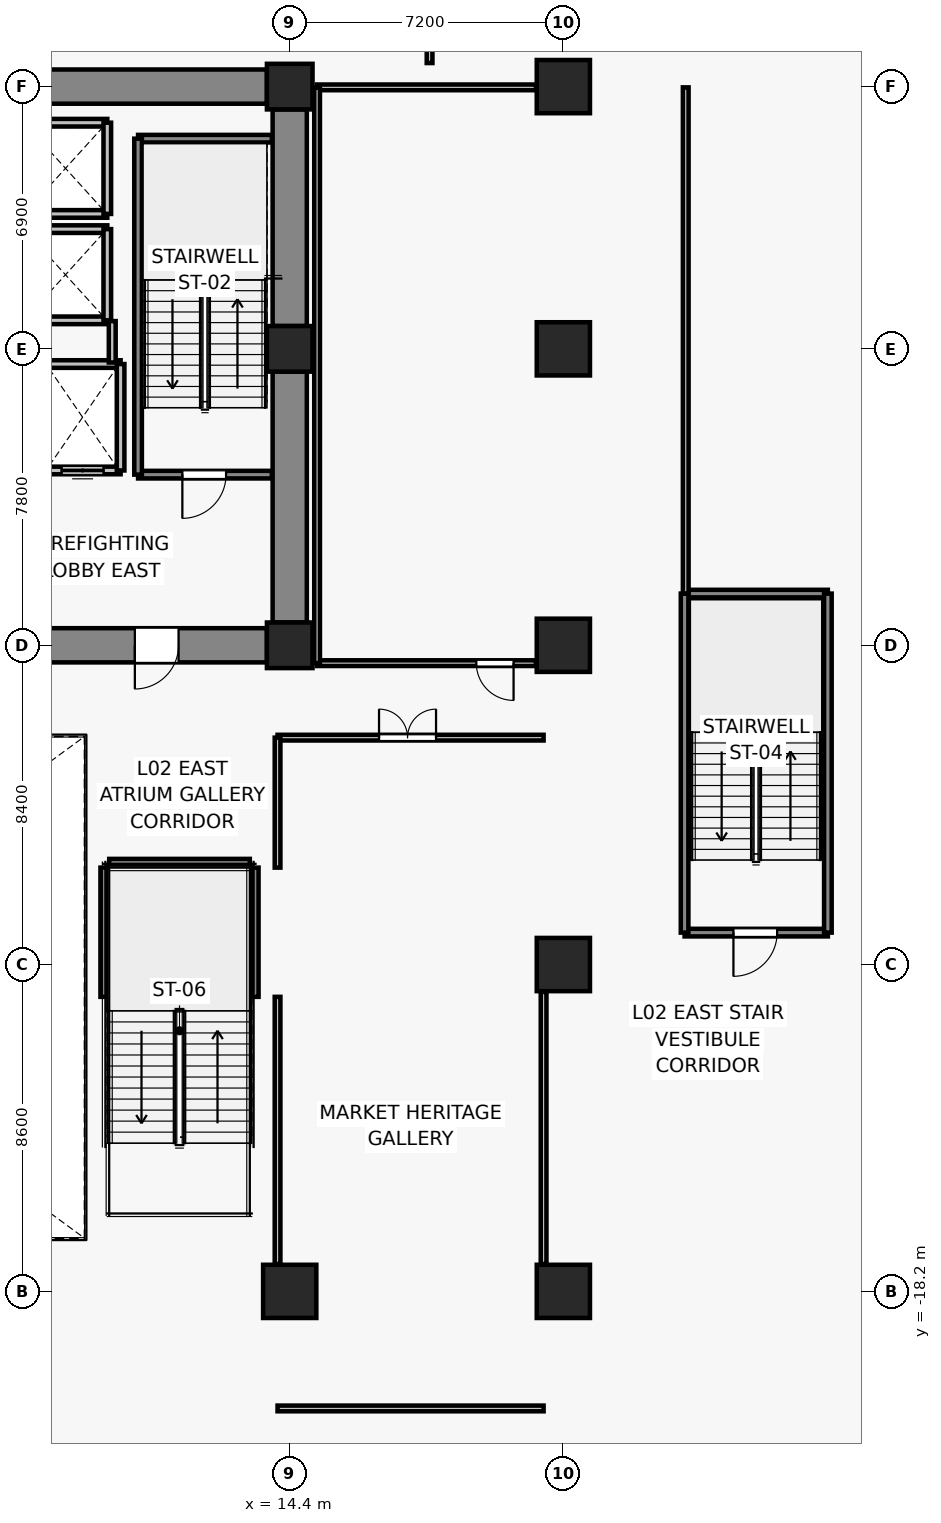
"""IFC4 building model, lengths in metres.
Left out: names, types, materials, properties, quantities, classifications, styles, units other than length and angle.
Written with IfcOpenShell. Run it as: python <this file> out.ifc"""

import sys

from ifc_helpers import new_model, si_unit, direction, frame, frame_2d, origin, origin_2d, place, context, subcontext, project, spatial, rectangle, extrude, source, transform, mapped, element, fill, save


model = new_model("IFC4")
c1 = context("Model", 3, precision=1e-05, world=origin(), true_north=direction((0.0, 1.0)))
c2 = subcontext(c1, "Body", "Model", "MODEL_VIEW")
j1 = project(units=[si_unit("LENGTHUNIT", "METRE"), si_unit("PLANEANGLEUNIT", "RADIAN")], contexts=[c1])
p1 = place(None, origin())
s1 = spatial("IfcSite", under=j1, at=p1, CompositionType="ELEMENT")
p2 = place(p1, origin())
s2 = spatial("IfcBuilding", under=s1, at=p2, CompositionType="ELEMENT")
p3 = place(p2, frame((0.0, 0.0, 9.4)))
s3 = spatial("IfcBuildingStorey", under=s2, at=p3, CompositionType="ELEMENT", Elevation=9.4)
for number, where, z_axis, x_axis in (
    (1, (14.4, -1.2, 0.0), (0.0, 0.0, 1.0), (1.0, 0.0, 0.0)),
    (2, (14.4, 6.6, 0.0), (0.0, 0.0, 1.0), (1.0, 0.0, 0.0)),
    (3, (14.4, 13.5, 0.0), (0.0, 0.0, 1.0), (1.0, 0.0, 0.0)),
):
    element("IfcColumn", number, at=place(p3, frame(where, z_axis=z_axis, x_axis=x_axis)), inside=s3, PredefinedType="COLUMN", context=c2, shape_type="SweptSolid", body=[
        extrude(rectangle(XDim=1.2, YDim=1.2, at=origin_2d()), origin(), (0.0, 0.0, 1.0), 4.4),
    ])
for number, where, z_axis, x_axis in (
    (4, (14.4, -18.2, 0.0), (0.0, 0.0, 1.0), (1.0, 0.0, 0.0)),
    (5, (21.6, -18.2, 0.0), (0.0, 0.0, 1.0), (1.0, 0.0, 0.0)),
    (6, (21.6, -9.6, 0.0), (0.0, 0.0, 1.0), (1.0, 0.0, 0.0)),
    (7, (21.6, -1.2, 0.0), (0.0, 0.0, 1.0), (1.0, 0.0, 0.0)),
    (8, (21.6, 6.6, 0.0), (0.0, 0.0, 1.0), (1.0, 0.0, 0.0)),
    (9, (21.6, 13.5, 0.0), (0.0, 0.0, 1.0), (1.0, 0.0, 0.0)),
):
    element("IfcColumn", number, at=place(p3, frame(where, z_axis=z_axis, x_axis=x_axis)), inside=s3, PredefinedType="COLUMN", context=c2, shape_type="SweptSolid", body=[
        extrude(rectangle(XDim=1.4, YDim=1.4, at=origin_2d()), origin(), (0.0, 0.0, 1.0), 4.4),
    ])
p4 = place(p3, frame((7.8, 13.5, 0.0), z_axis=(0.0, 0.0, 1.0), x_axis=(1.0, 0.0, 0.0)))
e10 = element("IfcWall", 10, at=p4, inside=s3, PredefinedType="SHEAR", context=c2, shape_type="SweptSolid", body=[
    extrude(rectangle(XDim=6.0, YDim=0.9, at=frame_2d((3.0, 0.0))), origin(), (0.0, 0.0, 1.0), 4.1),
])
p5 = place(p3, frame((14.4, -0.6, 0.0), z_axis=(0.0, 0.0, 1.0), x_axis=(0.0, 1.0, 0.0)))
e11 = element("IfcWall", 11, at=p5, inside=s3, PredefinedType="SHEAR", context=c2, shape_type="SweptSolid", body=[
    extrude(rectangle(XDim=6.6, YDim=0.9, at=frame_2d((3.3, 0.0))), origin(), (0.0, 0.0, 1.0), 4.1),
])
p6 = place(p3, frame((14.4, 7.2, 0.0), z_axis=(0.0, 0.0, 1.0), x_axis=(0.0, 1.0, 0.0)))
e12 = element("IfcWall", 12, at=p6, inside=s3, PredefinedType="SHEAR", context=c2, shape_type="SweptSolid", body=[
    extrude(rectangle(XDim=5.7, YDim=0.9, at=frame_2d((2.85, 0.0))), origin(), (0.0, 0.0, 1.0), 4.1),
])
p7 = place(p3, frame((13.8, -1.2, 0.0), z_axis=(0.0, 0.0, 1.0), x_axis=(-1.0, 0.0, 0.0)))
e13 = element("IfcWall", 13, at=p7, inside=s3, PredefinedType="SHEAR", context=c2, shape_type="SweptSolid", body=[
    extrude(rectangle(XDim=6.0, YDim=0.9, at=frame_2d((3.0, 0.0))), origin(), (0.0, 0.0, 1.0), 4.1),
])
p8 = place(p7, frame((2.325, 0.0, 0.0)))
e14 = element("IfcOpeningElement", 14, at=p8, cuts=e13, PredefinedType="OPENING", context=c2, shape_type="SweptSolid", body=[
    extrude(rectangle(XDim=1.15, YDim=2.15, at=frame_2d((0.575, 1.075))), frame((0.0, 0.46, 0.0), z_axis=(0.0, -1.0, 0.0), x_axis=(1.0, 0.0, 0.0)), (0.0, 0.0, 1.0), 0.92),
])
for number, where, z_axis, x_axis in (
    (15, (9.52, -10.45, 0.0), (0.0, 0.0, 1.0), (0.0, 1.0, 0.0)),
    (16, (13.48, -7.05, 0.0), (0.0, 0.0, 1.0), (0.0, -1.0, 0.0)),
):
    element("IfcWall", number, at=place(p3, frame(where, z_axis=z_axis, x_axis=x_axis)), inside=s3, PredefinedType="SOLIDWALL", context=c2, shape_type="SweptSolid", body=[
        extrude(rectangle(XDim=3.4, YDim=0.2, at=frame_2d((1.7, 0.0))), origin(), (0.0, 0.0, 1.0), 4.1),
    ])
p9 = place(p3, frame((9.65, -6.92, 0.0), z_axis=(0.0, 0.0, 1.0), x_axis=(1.0, 0.0, 0.0)))
e17 = element("IfcWall", 17, at=p9, inside=s3, PredefinedType="SOLIDWALL", context=c2, shape_type="SweptSolid", body=[
    extrude(rectangle(XDim=3.7, YDim=0.2, at=frame_2d((1.85, 0.0))), origin(), (0.0, 0.0, 1.0), 4.1),
])
p10 = place(p3, frame((9.95, 3.4, 0.0), z_axis=(0.0, 0.0, 1.0), x_axis=(-1.0, 0.0, 0.0)))
e18 = element("IfcWall", 18, at=p10, inside=s3, PredefinedType="SOLIDWALL", context=c2, shape_type="SweptSolid", body=[
    extrude(rectangle(XDim=2.0, YDim=0.2, at=frame_2d((1.0, 0.0))), origin(), (0.0, 0.0, 1.0), 4.1),
])
p11 = place(p10, frame((0.45, 0.0, 0.0)))
e19 = element("IfcOpeningElement", 19, at=p11, cuts=e18, PredefinedType="OPENING", context=c2, shape_type="SweptSolid", body=[
    extrude(rectangle(XDim=1.1, YDim=2.2, at=frame_2d((0.55, 1.1))), frame((0.0, 0.11, 0.0), z_axis=(0.0, -1.0, 0.0), x_axis=(1.0, 0.0, 0.0)), (0.0, 0.0, 1.0), 0.22),
])
p12 = place(p3, frame((7.95, 6.2, 0.0), z_axis=(0.0, 0.0, 1.0), x_axis=(1.0, 0.0, 0.0)))
e20 = element("IfcWall", 20, at=p12, inside=s3, PredefinedType="SOLIDWALL", context=c2, shape_type="SweptSolid", body=[
    extrude(rectangle(XDim=2.0, YDim=0.2, at=frame_2d((1.0, 0.0))), origin(), (0.0, 0.0, 1.0), 4.1),
])
p13 = place(p3, frame((9.95, 6.2, 0.0), z_axis=(0.0, 0.0, 1.0), x_axis=(0.0, -1.0, 0.0)))
e21 = element("IfcWall", 21, at=p13, inside=s3, PredefinedType="SOLIDWALL", context=c2, shape_type="SweptSolid", body=[
    extrude(rectangle(XDim=2.8, YDim=0.2, at=frame_2d((1.4, 0.0))), origin(), (0.0, 0.0, 1.0), 4.1),
])
for number, where, z_axis, x_axis in (
    (22, (9.6, 7.35, 0.0), (0.0, 0.0, 1.0), (-1.0, 0.0, 0.0)),
    (23, (7.4, 9.75, 0.0), (0.0, 0.0, 1.0), (1.0, 0.0, 0.0)),
):
    element("IfcWall", number, at=place(p3, frame(where, z_axis=z_axis, x_axis=x_axis)), inside=s3, PredefinedType="SOLIDWALL", context=c2, shape_type="SweptSolid", body=[
        extrude(rectangle(XDim=2.2, YDim=0.2, at=frame_2d((1.1, 0.0))), origin(), (0.0, 0.0, 1.0), 3.19),
    ])
p14 = place(p3, frame((9.6, 9.75, 0.0), z_axis=(0.0, 0.0, 1.0), x_axis=(0.0, -1.0, 0.0)))
e24 = element("IfcWall", 24, at=p14, inside=s3, PredefinedType="SOLIDWALL", context=c2, shape_type="SweptSolid", body=[
    extrude(rectangle(XDim=2.4, YDim=0.2, at=frame_2d((1.2, 0.0))), origin(), (0.0, 0.0, 1.0), 4.1),
])
for number, where, z_axis, x_axis in (
    (25, (9.6, 10.15, 0.0), (0.0, 0.0, 1.0), (-1.0, 0.0, 0.0)),
    (26, (7.4, 12.55, 0.0), (0.0, 0.0, 1.0), (1.0, 0.0, 0.0)),
):
    element("IfcWall", number, at=place(p3, frame(where, z_axis=z_axis, x_axis=x_axis)), inside=s3, PredefinedType="SOLIDWALL", context=c2, shape_type="SweptSolid", body=[
        extrude(rectangle(XDim=2.2, YDim=0.2, at=frame_2d((1.1, 0.0))), origin(), (0.0, 0.0, 1.0), 3.19),
    ])
p15 = place(p3, frame((9.6, 12.55, 0.0), z_axis=(0.0, 0.0, 1.0), x_axis=(0.0, -1.0, 0.0)))
e27 = element("IfcWall", 27, at=p15, inside=s3, PredefinedType="SOLIDWALL", context=c2, shape_type="SweptSolid", body=[
    extrude(rectangle(XDim=2.4, YDim=0.2, at=frame_2d((1.2, 0.0))), origin(), (0.0, 0.0, 1.0), 4.1),
])
p16 = place(p3, frame((13.93, 3.29, 0.0), z_axis=(0.0, 0.0, 1.0), x_axis=(-1.0, 0.0, 0.0)))
e28 = element("IfcWall", 28, at=p16, inside=s3, PredefinedType="SOLIDWALL", context=c2, shape_type="SweptSolid", body=[
    extrude(rectangle(XDim=3.52, YDim=0.2, at=frame_2d((1.76, 0.0))), origin(), (0.0, 0.0, 1.0), 4.1),
])
p17 = place(p16, frame((1.205, 0.0, 0.0)))
e29 = element("IfcOpeningElement", 29, at=p17, cuts=e28, PredefinedType="OPENING", context=c2, shape_type="SweptSolid", body=[
    extrude(rectangle(XDim=1.15, YDim=2.15, at=frame_2d((0.575, 1.075))), frame((0.0, 0.11, 0.0), z_axis=(0.0, -1.0, 0.0), x_axis=(1.0, 0.0, 0.0)), (0.0, 0.0, 1.0), 0.22),
])
p18 = place(p3, frame((10.41, 12.13, 0.0), z_axis=(0.0, 0.0, 1.0), x_axis=(1.0, 0.0, 0.0)))
e30 = element("IfcWall", 30, at=p18, inside=s3, PredefinedType="SOLIDWALL", context=c2, shape_type="SweptSolid", body=[
    extrude(rectangle(XDim=3.52, YDim=0.2, at=frame_2d((1.76, 0.0))), origin(), (0.0, 0.0, 1.0), 4.1),
])
p19 = place(p3, frame((10.41, 3.29, 0.0), z_axis=(0.0, 0.0, 1.0), x_axis=(0.0, 1.0, 0.0)))
e31 = element("IfcWall", 31, at=p19, inside=s3, PredefinedType="SOLIDWALL", context=c2, shape_type="SweptSolid", body=[
    extrude(rectangle(XDim=8.84, YDim=0.2, at=frame_2d((4.42, 0.0))), origin(), (0.0, 0.0, 1.0), 4.1),
])
p20 = place(p3, frame((9.73, 7.33, 0.0), z_axis=(0.0, 0.0, 1.0), x_axis=(0.0, -1.0, 0.0)))
e32 = element("IfcWall", 32, at=p20, inside=s3, PredefinedType="PARTITIONING", context=c2, shape_type="SweptSolid", body=[
    extrude(rectangle(XDim=1.09, YDim=0.18, at=frame_2d((0.545, 0.0))), origin(), (0.0, 0.0, 1.0), 4.1),
])
p21 = place(p3, frame((28.56, -8.76, 0.0), z_axis=(0.0, 0.0, 1.0), x_axis=(-1.0, 0.0, 0.0)))
e33 = element("IfcWall", 33, at=p21, inside=s3, PredefinedType="SOLIDWALL", context=c2, shape_type="SweptSolid", body=[
    extrude(rectangle(XDim=3.77, YDim=0.2, at=frame_2d((1.885, 0.0))), origin(), (0.0, 0.0, 1.0), 4.1),
])
p22 = place(p21, frame((1.335, 0.0, 0.0)))
e34 = element("IfcOpeningElement", 34, at=p22, cuts=e33, PredefinedType="OPENING", context=c2, shape_type="SweptSolid", body=[
    extrude(rectangle(XDim=1.15, YDim=2.15, at=frame_2d((0.575, 1.075))), frame((0.0, 0.11, 0.0), z_axis=(0.0, -1.0, 0.0), x_axis=(1.0, 0.0, 0.0)), (0.0, 0.0, 1.0), 0.22),
])
p23 = place(p3, frame((24.79, 0.16, 0.0), z_axis=(0.0, 0.0, 1.0), x_axis=(1.0, 0.0, 0.0)))
e35 = element("IfcWall", 35, at=p23, inside=s3, PredefinedType="SOLIDWALL", context=c2, shape_type="SweptSolid", body=[
    extrude(rectangle(XDim=3.77, YDim=0.2, at=frame_2d((1.885, 0.0))), origin(), (0.0, 0.0, 1.0), 4.1),
])
for number, where, z_axis, x_axis in (
    (36, (24.79, -8.76, 0.0), (0.0, 0.0, 1.0), (0.0, 1.0, 0.0)),
    (37, (28.56, 0.16, 0.0), (0.0, 0.0, 1.0), (0.0, -1.0, 0.0)),
):
    element("IfcWall", number, at=place(p3, frame(where, z_axis=z_axis, x_axis=x_axis)), inside=s3, PredefinedType="SOLIDWALL", context=c2, shape_type="SweptSolid", body=[
        extrude(rectangle(XDim=8.92, YDim=0.2, at=frame_2d((4.46, 0.0))), origin(), (0.0, 0.0, 1.0), 4.1),
    ])
p24 = place(p3, frame((21.08, -21.28, 0.0), z_axis=(0.0, 0.0, 1.0), x_axis=(-1.0, 0.0, 0.0)))
e38 = element("IfcWall", 38, at=p24, inside=s3, PredefinedType="PARTITIONING", context=c2, shape_type="SweptSolid", body=[
    extrude(rectangle(XDim=7.0, YDim=0.15, at=frame_2d((3.5, 0.0))), origin(), (0.0, 0.0, 1.0), 3.19),
])
p25 = place(p3, frame((14.08, -3.63, 0.0), z_axis=(0.0, 0.0, 1.0), x_axis=(1.0, 0.0, 0.0)))
e39 = element("IfcWall", 39, at=p25, inside=s3, PredefinedType="PARTITIONING", context=c2, shape_type="SweptSolid", body=[
    extrude(rectangle(XDim=7.0, YDim=0.15, at=frame_2d((3.5, 0.0))), origin(), (0.0, 0.0, 1.0), 3.239),
])
p26 = place(p25, frame((2.67, 0.0, 0.0)))
e40 = element("IfcOpeningElement", 40, at=p26, cuts=e39, PredefinedType="OPENING", context=c2, shape_type="SweptSolid", body=[
    extrude(rectangle(XDim=1.5, YDim=2.2, at=frame_2d((0.75, 1.1))), frame((0.0, 0.085, 0.0), z_axis=(0.0, -1.0, 0.0), x_axis=(1.0, 0.0, 0.0)), (0.0, 0.0, 1.0), 0.17),
])
p27 = place(p3, frame((14.08, -17.48, 0.0), z_axis=(0.0, 0.0, 1.0), x_axis=(0.0, 1.0, 0.0)))
e41 = element("IfcWall", 41, at=p27, inside=s3, PredefinedType="PARTITIONING", context=c2, shape_type="SweptSolid", body=[
    extrude(rectangle(XDim=7.03, YDim=0.15, at=frame_2d((3.515, 0.0))), origin(), (0.0, 0.0, 1.0), 3.29),
])
p28 = place(p3, frame((14.08, -7.05, 0.0), z_axis=(0.0, 0.0, 1.0), x_axis=(0.0, 1.0, 0.0)))
e42 = element("IfcWall", 42, at=p28, inside=s3, PredefinedType="PARTITIONING", context=c2, shape_type="SweptSolid", body=[
    extrude(rectangle(XDim=3.42, YDim=0.15, at=frame_2d((1.71, 0.0))), origin(), (0.0, 0.0, 1.0), 3.29),
])
p29 = place(p3, frame((21.08, -10.32, 0.0), z_axis=(0.0, 0.0, 1.0), x_axis=(0.0, -1.0, 0.0)))
e43 = element("IfcWall", 43, at=p29, inside=s3, PredefinedType="PARTITIONING", context=c2, shape_type="SweptSolid", body=[
    extrude(rectangle(XDim=7.16, YDim=0.15, at=frame_2d((3.58, 0.0))), origin(), (0.0, 0.0, 1.0), 3.29),
])
p30 = place(p3, frame((20.88, -1.67, 0.0), z_axis=(0.0, 0.0, 1.0), x_axis=(-1.0, 0.0, 0.0)))
e44 = element("IfcWall", 44, at=p30, inside=s3, PredefinedType="PARTITIONING", context=c2, shape_type="SweptSolid", body=[
    extrude(rectangle(XDim=5.76, YDim=0.15, at=frame_2d((2.88, 0.0))), origin(), (0.0, 0.0, 1.0), 4.1),
])
p31 = place(p30, frame((0.59, 0.0, 0.0)))
e45 = element("IfcOpeningElement", 45, at=p31, cuts=e44, PredefinedType="OPENING", context=c2, shape_type="SweptSolid", body=[
    extrude(rectangle(XDim=0.98, YDim=2.15, at=frame_2d((0.49, 1.075))), frame((0.0, 0.085, 0.0), z_axis=(0.0, -1.0, 0.0), x_axis=(1.0, 0.0, 0.0)), (0.0, 0.0, 1.0), 0.17),
])
p32 = place(p3, frame((15.12, 13.48, 0.0), z_axis=(0.0, 0.0, 1.0), x_axis=(1.0, 0.0, 0.0)))
e46 = element("IfcWall", 46, at=p32, inside=s3, PredefinedType="PARTITIONING", context=c2, shape_type="SweptSolid", body=[
    extrude(rectangle(XDim=5.76, YDim=0.15, at=frame_2d((2.88, 0.0))), origin(), (0.0, 0.0, 1.0), 3.19),
])
p33 = place(p3, frame((15.12, -1.67, 0.0), z_axis=(0.0, 0.0, 1.0), x_axis=(0.0, 1.0, 0.0)))
e47 = element("IfcWall", 47, at=p33, inside=s3, PredefinedType="PARTITIONING", context=c2, shape_type="SweptSolid", body=[
    extrude(rectangle(XDim=15.15, YDim=0.15, at=frame_2d((7.575, 0.0))), origin(), (0.0, 0.0, 1.0), 3.19),
])
p34 = place(p3, frame((24.82, 13.48, 0.0), z_axis=(0.0, 0.0, 1.0), x_axis=(0.0, -1.0, 0.0)))
e48 = element("IfcWall", 48, at=p34, inside=s3, PredefinedType="PARTITIONING", context=c2, shape_type="SweptSolid", body=[
    extrude(rectangle(XDim=13.32, YDim=0.15, at=frame_2d((6.66, 0.0))), origin(), (0.0, 0.0, 1.0), 3.19),
])
p35 = place(p3, frame((18.08, 21.88, 0.0), z_axis=(0.0, 0.0, 1.0), x_axis=(0.0, -1.0, 0.0)))
e49 = element("IfcWall", 49, at=p35, inside=s3, PredefinedType="PARTITIONING", context=c2, shape_type="SweptSolid", body=[
    extrude(rectangle(XDim=7.76, YDim=0.15, at=frame_2d((3.88, 0.0))), origin(), (0.0, 0.0, 1.0), 3.19),
])
m1 = source(origin(), c2, "Body", "SweptSolid", [
    extrude(rectangle(XDim=1.1, YDim=2.2, at=frame_2d((0.55, 1.1))), frame((0.0, 0.025, 0.0), z_axis=(0.0, -1.0, 0.0), x_axis=(1.0, 0.0, 0.0)), (0.0, 0.0, 1.0), 0.05),
])
p36 = place(p11, origin())
e50 = element("IfcDoor", 50, at=p36, inside=s3, OperationType="DOUBLE_DOOR_SLIDING", PredefinedType="DOOR", context=c2, shape_type="MappedRepresentation", body=[
    mapped(m1, transform((0.0, 0.0, 0.0), x_axis=(1.0, 0.0, 0.0), y_axis=(0.0, 1.0, 0.0), z_axis=(0.0, 0.0, 1.0), scale=1.0)),
])
fill(e19, e50)
m2 = source(origin(), c2, "Body", "SweptSolid", [
    extrude(rectangle(XDim=1.15, YDim=2.15, at=frame_2d((0.575, 1.075))), frame((0.0, 0.025, 0.0), z_axis=(0.0, -1.0, 0.0), x_axis=(1.0, 0.0, 0.0)), (0.0, 0.0, 1.0), 0.05),
])
p37 = place(p17, origin())
e51 = element("IfcDoor", 51, at=p37, inside=s3, OperationType="SINGLE_SWING_RIGHT", PredefinedType="DOOR", context=c2, shape_type="MappedRepresentation", body=[
    mapped(m2, transform((0.0, 0.0, 0.0), x_axis=(1.0, 0.0, 0.0), y_axis=(0.0, 1.0, 0.0), z_axis=(0.0, 0.0, 1.0), scale=1.0)),
])
fill(e29, e51)
p38 = place(p8, origin())
e52 = element("IfcDoor", 52, at=p38, inside=s3, OperationType="SINGLE_SWING_RIGHT", PredefinedType="DOOR", context=c2, shape_type="MappedRepresentation", body=[
    mapped(m2, transform((0.0, 0.0, 0.0), x_axis=(1.0, 0.0, 0.0), y_axis=(0.0, 1.0, 0.0), z_axis=(0.0, 0.0, 1.0), scale=1.0)),
])
fill(e14, e52)
p39 = place(p22, origin())
e53 = element("IfcDoor", 53, at=p39, inside=s3, OperationType="SINGLE_SWING_RIGHT", PredefinedType="DOOR", context=c2, shape_type="MappedRepresentation", body=[
    mapped(m2, transform((0.0, 0.0, 0.0), x_axis=(1.0, 0.0, 0.0), y_axis=(0.0, 1.0, 0.0), z_axis=(0.0, 0.0, 1.0), scale=1.0)),
])
fill(e34, e53)
m3 = source(origin(), c2, "Body", "SweptSolid", [
    extrude(rectangle(XDim=1.5, YDim=2.2, at=frame_2d((0.75, 1.1))), frame((0.0, 0.025, 0.0), z_axis=(0.0, -1.0, 0.0), x_axis=(1.0, 0.0, 0.0)), (0.0, 0.0, 1.0), 0.05),
])
p40 = place(p26, origin())
e54 = element("IfcDoor", 54, at=p40, inside=s3, OperationType="DOUBLE_DOOR_SINGLE_SWING", PredefinedType="DOOR", context=c2, shape_type="MappedRepresentation", body=[
    mapped(m3, transform((0.0, 0.0, 0.0), x_axis=(1.0, 0.0, 0.0), y_axis=(0.0, 1.0, 0.0), z_axis=(0.0, 0.0, 1.0), scale=1.0)),
])
fill(e40, e54)
m4 = source(origin(), c2, "Body", "SweptSolid", [
    extrude(rectangle(XDim=0.98, YDim=2.15, at=frame_2d((0.49, 1.075))), frame((0.0, 0.025, 0.0), z_axis=(0.0, -1.0, 0.0), x_axis=(1.0, 0.0, 0.0)), (0.0, 0.0, 1.0), 0.05),
])
p41 = place(p31, origin())
e55 = element("IfcDoor", 55, at=p41, inside=s3, OperationType="SINGLE_SWING_LEFT", PredefinedType="DOOR", context=c2, shape_type="MappedRepresentation", body=[
    mapped(m4, transform((0.0, 0.0, 0.0), x_axis=(1.0, 0.0, 0.0), y_axis=(0.0, 1.0, 0.0), z_axis=(0.0, 0.0, 1.0), scale=1.0)),
])
fill(e45, e55)
save(model, sys.argv[1])
